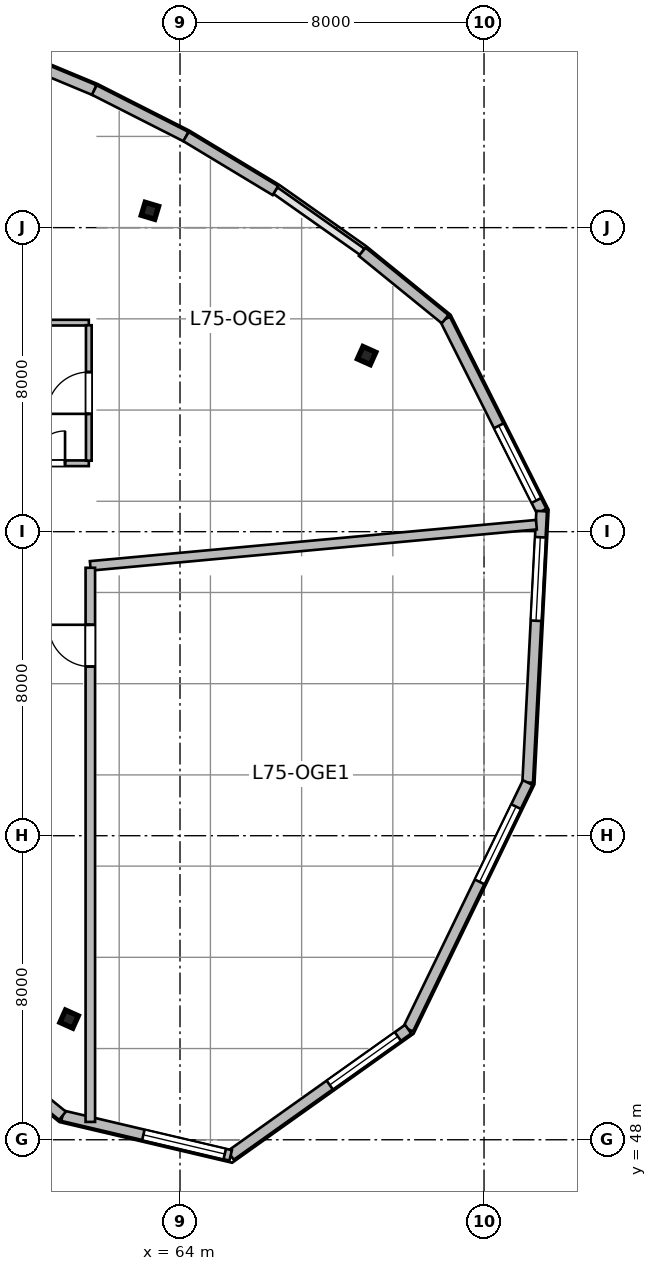
"""IFC4 building model, lengths in metres.
Left out: names, types, materials, properties, quantities, classifications, styles, units other than length and angle.
Written with IfcOpenShell. Run it as: python <this file> out.ifc"""

import sys

from ifc_helpers import new_model, si_unit, direction, frame, frame_2d, origin, origin_2d, place, context, subcontext, project, spatial, rectangle, i_section, extrude, source, transform, mapped, element, fill, save


model = new_model("IFC4")
c1 = context("Model", 3, precision=1e-05, world=origin(), true_north=direction((0.0, 1.0)))
c2 = subcontext(c1, "Body", "Model", "MODEL_VIEW")
j1 = project(units=[si_unit("LENGTHUNIT", "METRE"), si_unit("PLANEANGLEUNIT", "RADIAN")], contexts=[c1])
p1 = place(None, origin())
s1 = spatial("IfcSite", under=j1, at=p1, CompositionType="ELEMENT")
p2 = place(p1, origin())
s2 = spatial("IfcBuilding", under=s1, at=p2, CompositionType="ELEMENT")
p3 = place(p2, frame((0.0, 0.0, 307.8)))
s3 = spatial("IfcBuildingStorey", under=s2, at=p3, CompositionType="ELEMENT", Elevation=307.8)
m1 = source(origin(), c2, "Body", "SweptSolid", [
    extrude(i_section(OverallWidth=0.369, OverallDepth=0.356, WebThickness=0.011, FlangeThickness=0.018, at=origin_2d()), origin(), (0.0, 0.0, 1.0), 4.8),
])
for number, where, z_axis, x_axis in (
    (1, (63.209, 72.442, 0.0), (0.0, 0.0, 1.0), (0.289, 0.957, 0.0)),
    (2, (61.082, 51.175, 0.0), (0.0, 0.0, 1.0), (0.409, 0.912, 0.0)),
    (3, (68.91, 68.633, 0.0), (0.0, 0.0, 1.0), (0.409, 0.912, 0.0)),
):
    element("IfcColumn", number, at=place(p3, frame(where, z_axis=z_axis, x_axis=x_axis)), inside=s3, PredefinedType="COLUMN", context=c2, shape_type="MappedRepresentation", body=[
        mapped(m1, transform((0.0, 0.0, 0.0), scale=1.0)),
    ])
m2 = source(origin(), c2, "Body", "SweptSolid", [
    extrude(rectangle(XDim=5.653, YDim=0.28, at=frame_2d((2.827, 0.0))), origin(), (0.0, 0.0, 1.0), 4.5),
])
p4 = place(p3, frame((70.976, 69.591, 0.0), z_axis=(0.0, 0.0, 1.0), x_axis=(0.449302555419, -0.893379658205, 0.0)))
e4 = element("IfcWall", 4, at=p4, inside=s3, PredefinedType="SOLIDWALL", context=c2, shape_type="MappedRepresentation", body=[
    mapped(m2, transform((0.0, 0.0, 0.0), scale=1.0)),
])
p5 = place(p4, frame((3.14, 0.0, 0.95)))
e5 = element("IfcOpeningElement", 5, at=p5, cuts=e4, PredefinedType="OPENING", context=c2, shape_type="SweptSolid", body=[
    extrude(rectangle(XDim=2.2, YDim=2.1, at=frame_2d((1.1, 1.05))), frame((0.0, 0.15, 0.0), z_axis=(0.0, -1.0, 0.0), x_axis=(1.0, 0.0, 0.0)), (0.0, 0.0, 1.0), 0.3),
])
m3 = source(origin(), c2, "Body", "SweptSolid", [
    extrude(rectangle(XDim=7.151, YDim=0.28, at=frame_2d((3.576, 0.0))), origin(), (0.0, 0.0, 1.0), 4.5),
])
p6 = place(p3, frame((73.516, 64.54, 0.0), z_axis=(0.0, 0.0, 1.0), x_axis=(-0.051449614265, -0.998675591567, 0.0)))
e6 = element("IfcWall", 6, at=p6, inside=s3, PredefinedType="SOLIDWALL", context=c2, shape_type="MappedRepresentation", body=[
    mapped(m3, transform((0.0, 0.0, 0.0), scale=1.0)),
])
p7 = place(p6, frame((0.688, 0.0, 0.95)))
e7 = element("IfcOpeningElement", 7, at=p7, cuts=e6, PredefinedType="OPENING", context=c2, shape_type="SweptSolid", body=[
    extrude(rectangle(XDim=2.2, YDim=2.1, at=frame_2d((1.1, 1.05))), frame((0.0, 0.15, 0.0), z_axis=(0.0, -1.0, 0.0), x_axis=(1.0, 0.0, 0.0)), (0.0, 0.0, 1.0), 0.3),
])
m4 = source(origin(), c2, "Body", "SweptSolid", [
    extrude(rectangle(XDim=7.211, YDim=0.28, at=frame_2d((3.606, 0.0))), origin(), (0.0, 0.0, 1.0), 4.5),
])
p8 = place(p3, frame((73.148, 57.399, 0.0), z_axis=(0.0, 0.0, 1.0), x_axis=(-0.436088263006, -0.899903898685, 0.0)))
e8 = element("IfcWall", 8, at=p8, inside=s3, PredefinedType="SOLIDWALL", context=c2, shape_type="MappedRepresentation", body=[
    mapped(m4, transform((0.0, 0.0, 0.0), scale=1.0)),
])
p9 = place(p8, frame((0.703, 0.0, 0.95)))
e9 = element("IfcOpeningElement", 9, at=p9, cuts=e8, PredefinedType="OPENING", context=c2, shape_type="SweptSolid", body=[
    extrude(rectangle(XDim=2.2, YDim=2.1, at=frame_2d((1.1, 1.05))), frame((0.0, 0.15, 0.0), z_axis=(0.0, -1.0, 0.0), x_axis=(1.0, 0.0, 0.0)), (0.0, 0.0, 1.0), 0.3),
])
m5 = source(origin(), c2, "Body", "SweptSolid", [
    extrude(rectangle(XDim=5.731, YDim=0.28, at=frame_2d((2.865, 0.0))), origin(), (0.0, 0.0, 1.0), 4.5),
])
p10 = place(p3, frame((70.004, 50.909, 0.0), z_axis=(0.0, 0.0, 1.0), x_axis=(-0.815021045908, -0.579431354629, 0.0)))
e10 = element("IfcWall", 10, at=p10, inside=s3, PredefinedType="SOLIDWALL", context=c2, shape_type="MappedRepresentation", body=[
    mapped(m5, transform((0.0, 0.0, 0.0), scale=1.0)),
])
p11 = place(p10, frame((0.333, 0.0, 0.95)))
e11 = element("IfcOpeningElement", 11, at=p11, cuts=e10, PredefinedType="OPENING", context=c2, shape_type="SweptSolid", body=[
    extrude(rectangle(XDim=2.2, YDim=2.1, at=frame_2d((1.1, 1.05))), frame((0.0, 0.15, 0.0), z_axis=(0.0, -1.0, 0.0), x_axis=(1.0, 0.0, 0.0)), (0.0, 0.0, 1.0), 0.3),
])
m6 = source(origin(), c2, "Body", "SweptSolid", [
    extrude(rectangle(XDim=4.547, YDim=0.28, at=frame_2d((2.273, 0.0))), origin(), (0.0, 0.0, 1.0), 4.5),
])
p12 = place(p3, frame((65.333, 47.589, 0.0), z_axis=(0.0, 0.0, 1.0), x_axis=(-0.973332593516, 0.229398479505, 0.0)))
e12 = element("IfcWall", 12, at=p12, inside=s3, PredefinedType="SOLIDWALL", context=c2, shape_type="MappedRepresentation", body=[
    mapped(m6, transform((0.0, 0.0, 0.0), scale=1.0)),
])
p13 = place(p12, frame((0.16, 0.0, 0.95)))
e13 = element("IfcOpeningElement", 13, at=p13, cuts=e12, PredefinedType="OPENING", context=c2, shape_type="SweptSolid", body=[
    extrude(rectangle(XDim=2.2, YDim=2.1, at=frame_2d((1.1, 1.05))), frame((0.0, 0.15, 0.0), z_axis=(0.0, -1.0, 0.0), x_axis=(1.0, 0.0, 0.0)), (0.0, 0.0, 1.0), 0.3),
])
m7 = source(origin(), c2, "Body", "SweptSolid", [
    extrude(rectangle(XDim=1.543, YDim=0.28, at=frame_2d((0.772, 0.0))), origin(), (0.0, 0.0, 1.0), 4.5),
])
p14 = place(p3, frame((60.908, 48.632, 0.0), z_axis=(0.0, 0.0, 1.0), x_axis=(-0.77582846857, 0.63094388606, 0.0)))
e14 = element("IfcWall", 14, at=p14, inside=s3, PredefinedType="SOLIDWALL", context=c2, shape_type="MappedRepresentation", body=[
    mapped(m7, transform((0.0, 0.0, 0.0), scale=1.0)),
])
m8 = source(origin(), c2, "Body", "SweptSolid", [
    extrude(rectangle(XDim=2.668, YDim=0.28, at=frame_2d((1.334, 0.0))), origin(), (0.0, 0.0, 1.0), 4.5),
])
p15 = place(p3, frame((59.281, 76.645, 0.0), z_axis=(0.0, 0.0, 1.0), x_axis=(0.923290633029, -0.384102078828, 0.0)))
e15 = element("IfcWall", 15, at=p15, inside=s3, PredefinedType="SOLIDWALL", context=c2, shape_type="MappedRepresentation", body=[
    mapped(m8, transform((0.0, 0.0, 0.0), scale=1.0)),
])
m9 = source(origin(), c2, "Body", "SweptSolid", [
    extrude(rectangle(XDim=2.706, YDim=0.28, at=frame_2d((1.353, 0.0))), origin(), (0.0, 0.0, 1.0), 4.5),
])
p16 = place(p3, frame((61.745, 75.62, 0.0), z_axis=(0.0, 0.0, 1.0), x_axis=(0.891648836287, -0.452727680564, 0.0)))
e16 = element("IfcWall", 16, at=p16, inside=s3, PredefinedType="SOLIDWALL", context=c2, shape_type="MappedRepresentation", body=[
    mapped(m9, transform((0.0, 0.0, 0.0), scale=1.0)),
])
m10 = source(origin(), c2, "Body", "SweptSolid", [
    extrude(rectangle(XDim=2.748, YDim=0.28, at=frame_2d((1.374, 0.0))), origin(), (0.0, 0.0, 1.0), 4.5),
])
p17 = place(p3, frame((64.157, 74.396, 0.0), z_axis=(0.0, 0.0, 1.0), x_axis=(0.856149718453, -0.516727838996, 0.0)))
e17 = element("IfcWall", 17, at=p17, inside=s3, PredefinedType="SOLIDWALL", context=c2, shape_type="MappedRepresentation", body=[
    mapped(m10, transform((0.0, 0.0, 0.0), scale=1.0)),
])
m11 = source(origin(), c2, "Body", "SweptSolid", [
    extrude(rectangle(XDim=2.812, YDim=0.28, at=frame_2d((1.406, 0.0))), origin(), (0.0, 0.0, 1.0), 4.5),
])
p18 = place(p3, frame((68.795, 71.365, 0.0), z_axis=(0.0, 0.0, 1.0), x_axis=(0.775880230716, -0.630880232361, 0.0)))
e18 = element("IfcWall", 18, at=p18, inside=s3, PredefinedType="SOLIDWALL", context=c2, shape_type="MappedRepresentation", body=[
    mapped(m11, transform((0.0, 0.0, 0.0), scale=1.0)),
])
m12 = source(origin(), c2, "Body", "SweptSolid", [
    extrude(rectangle(XDim=2.1, YDim=0.15, at=frame_2d((1.05, 0.0))), origin(), (0.0, 0.0, 1.0), 4.5),
])
p19 = place(p3, frame((59.5, 65.8, 0.0), z_axis=(0.0, 0.0, 1.0), x_axis=(1.0, 0.0, 0.0)))
e19 = element("IfcWall", 19, at=p19, inside=s3, PredefinedType="PARTITIONING", context=c2, shape_type="MappedRepresentation", body=[
    mapped(m12, transform((0.0, 0.0, 0.0), scale=1.0)),
])
p20 = place(p19, frame((0.625, 0.0, 0.0)))
e20 = element("IfcOpeningElement", 20, at=p20, cuts=e19, PredefinedType="OPENING", context=c2, shape_type="SweptSolid", body=[
    extrude(rectangle(XDim=0.85, YDim=2.1, at=frame_2d((0.425, 1.05))), frame((0.0, 0.085, 0.0), z_axis=(0.0, -1.0, 0.0), x_axis=(1.0, 0.0, 0.0)), (0.0, 0.0, 1.0), 0.17),
])
p21 = place(p3, frame((59.5, 69.5, 0.0), z_axis=(0.0, 0.0, 1.0), x_axis=(1.0, 0.0, 0.0)))
e21 = element("IfcWall", 21, at=p21, inside=s3, PredefinedType="PARTITIONING", context=c2, shape_type="MappedRepresentation", body=[
    mapped(m12, transform((0.0, 0.0, 0.0), scale=1.0)),
])
m13 = source(origin(), c2, "Body", "SweptSolid", [
    extrude(rectangle(XDim=3.565, YDim=0.15, at=frame_2d((1.783, 0.0))), origin(), (0.0, 0.0, 1.0), 4.5),
])
p22 = place(p3, frame((61.6, 65.867, 0.0), z_axis=(0.0, 0.0, 1.0), x_axis=(0.0, 1.0, 0.0)))
e22 = element("IfcWall", 22, at=p22, inside=s3, PredefinedType="PARTITIONING", context=c2, shape_type="MappedRepresentation", body=[
    mapped(m13, transform((0.0, 0.0, 0.0), scale=1.0)),
])
p23 = place(p22, frame((1.232, 0.0, 0.0)))
e23 = element("IfcOpeningElement", 23, at=p23, cuts=e22, PredefinedType="OPENING", context=c2, shape_type="SweptSolid", body=[
    extrude(rectangle(XDim=1.1, YDim=2.15, at=frame_2d((0.55, 1.075))), frame((0.0, 0.085, 0.0), z_axis=(0.0, -1.0, 0.0), x_axis=(1.0, 0.0, 0.0)), (0.0, 0.0, 1.0), 0.17),
])
m14 = source(origin(), c2, "Body", "SweptSolid", [
    extrude(rectangle(XDim=11.788, YDim=0.25, at=frame_2d((5.894, 0.0))), origin(), (0.0, 0.0, 1.0), 4.5),
])
p24 = place(p3, frame((61.64, 63.1, 0.0), z_axis=(0.0, 0.0, 1.0), x_axis=(0.995763003616, 0.091956732379, 0.0)))
e24 = element("IfcWall", 24, at=p24, inside=s3, PredefinedType="PARTITIONING", context=c2, shape_type="MappedRepresentation", body=[
    mapped(m14, transform((0.0, 0.0, 0.0), scale=1.0)),
])
m15 = source(origin(), c2, "Body", "SweptSolid", [
    extrude(rectangle(XDim=14.581, YDim=0.25, at=frame_2d((7.291, 0.0))), origin(), (0.0, 0.0, 1.0), 4.174),
])
p25 = place(p3, frame((61.64, 48.469, 0.0), z_axis=(0.0, 0.0, 1.0), x_axis=(0.0, 1.0, 0.0)))
e25 = element("IfcWall", 25, at=p25, inside=s3, PredefinedType="PARTITIONING", context=c2, shape_type="MappedRepresentation", body=[
    mapped(m15, transform((0.0, 0.0, 0.0), scale=1.0)),
])
p26 = place(p25, frame((11.981, 0.0, 0.0)))
e26 = element("IfcOpeningElement", 26, at=p26, cuts=e25, PredefinedType="OPENING", context=c2, shape_type="SweptSolid", body=[
    extrude(rectangle(XDim=1.1, YDim=2.15, at=frame_2d((0.55, 1.075))), frame((0.0, 0.135, 0.0), z_axis=(0.0, -1.0, 0.0), x_axis=(1.0, 0.0, 0.0)), (0.0, 0.0, 1.0), 0.27),
])
m16 = source(origin(), c2, "Body", "SweptSolid", [
    extrude(rectangle(XDim=2.2, YDim=2.1, at=frame_2d((1.1, 1.05))), frame((0.0, 0.03, 0.0), z_axis=(0.0, -1.0, 0.0), x_axis=(1.0, 0.0, 0.0)), (0.0, 0.0, 1.0), 0.06),
])
p27 = place(p5, origin())
e27 = element("IfcWindow", 27, at=p27, inside=s3, PartitioningType="TRIPLE_PANEL_VERTICAL", PredefinedType="WINDOW", context=c2, shape_type="MappedRepresentation", body=[
    mapped(m16, transform((0.0, 0.0, 0.0), scale=1.0)),
])
fill(e5, e27)
p28 = place(p7, origin())
e28 = element("IfcWindow", 28, at=p28, inside=s3, PartitioningType="TRIPLE_PANEL_VERTICAL", PredefinedType="WINDOW", context=c2, shape_type="MappedRepresentation", body=[
    mapped(m16, transform((0.0, 0.0, 0.0), scale=1.0)),
])
fill(e7, e28)
p29 = place(p9, origin())
e29 = element("IfcWindow", 29, at=p29, inside=s3, PartitioningType="TRIPLE_PANEL_VERTICAL", PredefinedType="WINDOW", context=c2, shape_type="MappedRepresentation", body=[
    mapped(m16, transform((0.0, 0.0, 0.0), scale=1.0)),
])
fill(e9, e29)
p30 = place(p11, origin())
e30 = element("IfcWindow", 30, at=p30, inside=s3, PartitioningType="TRIPLE_PANEL_VERTICAL", PredefinedType="WINDOW", context=c2, shape_type="MappedRepresentation", body=[
    mapped(m16, transform((0.0, 0.0, 0.0), scale=1.0)),
])
fill(e11, e30)
p31 = place(p13, origin())
e31 = element("IfcWindow", 31, at=p31, inside=s3, PartitioningType="TRIPLE_PANEL_VERTICAL", PredefinedType="WINDOW", context=c2, shape_type="MappedRepresentation", body=[
    mapped(m16, transform((0.0, 0.0, 0.0), scale=1.0)),
])
fill(e13, e31)
m17 = source(origin(), c2, "Body", "SweptSolid", [
    extrude(rectangle(XDim=0.85, YDim=2.1, at=frame_2d((0.425, 1.05))), frame((0.0, 0.025, 0.0), z_axis=(0.0, -1.0, 0.0), x_axis=(1.0, 0.0, 0.0)), (0.0, 0.0, 1.0), 0.05),
])
p32 = place(p20, origin())
e32 = element("IfcDoor", 32, at=p32, inside=s3, OperationType="SINGLE_SWING_RIGHT", PredefinedType="DOOR", context=c2, shape_type="MappedRepresentation", body=[
    mapped(m17, transform((0.0, 0.0, 0.0), scale=1.0)),
])
fill(e20, e32)
m18 = source(origin(), c2, "Body", "SweptSolid", [
    extrude(rectangle(XDim=1.1, YDim=2.15, at=frame_2d((0.55, 1.075))), frame((0.0, 0.025, 0.0), z_axis=(0.0, -1.0, 0.0), x_axis=(1.0, 0.0, 0.0)), (0.0, 0.0, 1.0), 0.05),
])
p33 = place(p26, origin())
e33 = element("IfcDoor", 33, at=p33, inside=s3, OperationType="SINGLE_SWING_RIGHT", PredefinedType="DOOR", context=c2, shape_type="MappedRepresentation", body=[
    mapped(m18, transform((0.0, 0.0, 0.0), scale=1.0)),
])
fill(e26, e33)
p34 = place(p23, origin())
e34 = element("IfcDoor", 34, at=p34, inside=s3, OperationType="SINGLE_SWING_LEFT", PredefinedType="DOOR", context=c2, shape_type="MappedRepresentation", body=[
    mapped(m18, transform((0.0, 0.0, 0.0), scale=1.0)),
])
fill(e23, e34)
save(model, sys.argv[1])
